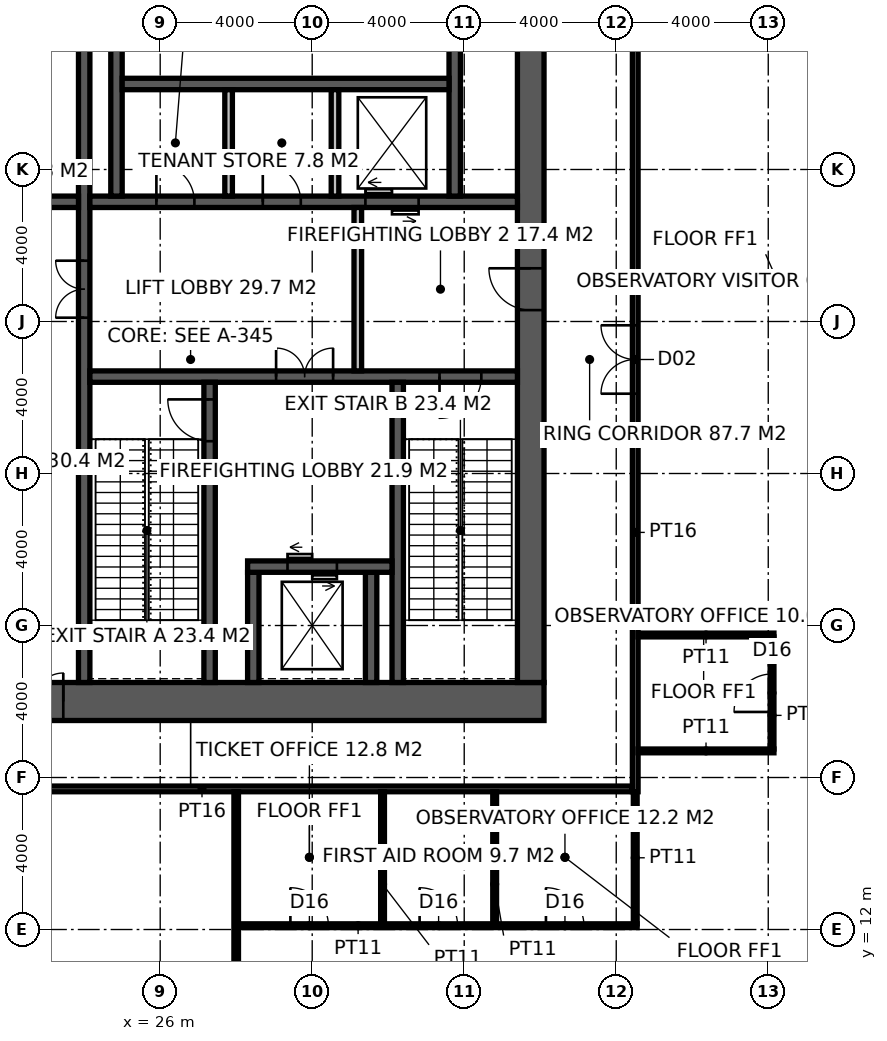
"""IFC4 building model, lengths in metres.
Left out: names, types, materials, properties, quantities, classifications, styles, units other than length and angle.
Written with IfcOpenShell. Run it as: python <this file> out.ifc"""

import sys

from ifc_helpers import new_model, si_unit, direction, frame, frame_2d, origin, place, context, subcontext, project, spatial, rectangle, extrude, element, fill, save


model = new_model("IFC4")
c1 = context("Model", 3, precision=1e-05, world=origin(), true_north=direction((0.0, 1.0)))
c2 = subcontext(c1, "Body", "Model", "MODEL_VIEW")
j1 = project(units=[si_unit("LENGTHUNIT", "METRE"), si_unit("PLANEANGLEUNIT", "RADIAN")], contexts=[c1])
p1 = place(None, origin())
s1 = spatial("IfcSite", under=j1, at=p1, CompositionType="ELEMENT")
p2 = place(p1, origin())
s2 = spatial("IfcBuilding", under=s1, at=p2, CompositionType="ELEMENT")
p3 = place(p2, frame((0.0, 0.0, 298.2)))
s3 = spatial("IfcBuildingStorey", under=s2, at=p3, CompositionType="ELEMENT", Elevation=298.2)
p4 = place(p3, frame((18.5, 18.0, -0.15), z_axis=(0.0, 0.0, 1.0), x_axis=(1.0, 0.0, 0.0)))
e1 = element("IfcWall", 1, at=p4, inside=s3, PredefinedType="SHEAR", context=c2, shape_type="SweptSolid", body=[
    extrude(rectangle(XDim=17.6, YDim=1.0, at=frame_2d((8.8, 0.0))), origin(), (0.0, 0.0, 1.0), 5.85),
])
p5 = place(p4, frame((3.45, 0.0, 0.15)))
e2 = element("IfcOpeningElement", 2, at=p5, cuts=e1, PredefinedType="OPENING", context=c2, shape_type="SweptSolid", body=[
    extrude(rectangle(XDim=1.5, YDim=2.4, at=frame_2d((0.75, 1.2))), frame((0.0, 0.51, 0.0), z_axis=(0.0, -1.0, 0.0), x_axis=(1.0, 0.0, 0.0)), (0.0, 0.0, 1.0), 1.02),
])
p6 = place(p3, frame((35.75, 18.5, -0.15), z_axis=(0.0, 0.0, 1.0), x_axis=(0.0, 1.0, 0.0)))
e3 = element("IfcWall", 3, at=p6, inside=s3, PredefinedType="SHEAR", context=c2, shape_type="SweptSolid", body=[
    extrude(rectangle(XDim=17.0, YDim=0.7, at=frame_2d((8.5, 0.0))), origin(), (0.0, 0.0, 1.0), 5.85),
])
p7 = place(p6, frame((9.8, 0.0, 0.15)))
e4 = element("IfcOpeningElement", 4, at=p7, cuts=e3, PredefinedType="OPENING", context=c2, shape_type="SweptSolid", body=[
    extrude(rectangle(XDim=1.1, YDim=2.2, at=frame_2d((0.55, 1.1))), frame((0.0, 0.36, 0.0), z_axis=(0.0, -1.0, 0.0), x_axis=(1.0, 0.0, 0.0)), (0.0, 0.0, 1.0), 0.72),
])
p8 = place(p3, frame((24.0, 18.5, -0.15), z_axis=(0.0, 0.0, 1.0), x_axis=(0.0, 1.0, 0.0)))
e5 = element("IfcWall", 5, at=p8, inside=s3, PredefinedType="SHEAR", context=c2, shape_type="SweptSolid", body=[
    extrude(rectangle(XDim=17.0, YDim=0.3, at=frame_2d((8.5, 0.0))), origin(), (0.0, 0.0, 1.0), 5.85),
])
p9 = place(p8, frame((9.6, 0.0, 0.15)))
e6 = element("IfcOpeningElement", 6, at=p9, cuts=e5, PredefinedType="OPENING", context=c2, shape_type="SweptSolid", body=[
    extrude(rectangle(XDim=1.5, YDim=2.4, at=frame_2d((0.75, 1.2))), frame((0.0, 0.16, 0.0), z_axis=(0.0, -1.0, 0.0), x_axis=(1.0, 0.0, 0.0)), (0.0, 0.0, 1.0), 0.32),
])
p10 = place(p3, frame((24.15, 26.55, -0.15), z_axis=(0.0, 0.0, 1.0), x_axis=(1.0, 0.0, 0.0)))
e7 = element("IfcWall", 7, at=p10, inside=s3, PredefinedType="SHEAR", context=c2, shape_type="SweptSolid", body=[
    extrude(rectangle(XDim=11.25, YDim=0.3, at=frame_2d((5.625, 0.0))), origin(), (0.0, 0.0, 1.0), 5.85),
])
p11 = place(p10, frame((9.2, 0.0, 0.15)))
e8 = element("IfcOpeningElement", 8, at=p11, cuts=e7, PredefinedType="OPENING", context=c2, shape_type="SweptSolid", body=[
    extrude(rectangle(XDim=1.1, YDim=2.2, at=frame_2d((0.55, 1.1))), frame((0.0, 0.16, 0.0), z_axis=(0.0, -1.0, 0.0), x_axis=(1.0, 0.0, 0.0)), (0.0, 0.0, 1.0), 0.32),
])
p12 = place(p10, frame((4.9, 0.0, 0.15)))
e9 = element("IfcOpeningElement", 9, at=p12, cuts=e7, PredefinedType="OPENING", context=c2, shape_type="SweptSolid", body=[
    extrude(rectangle(XDim=1.5, YDim=2.4, at=frame_2d((0.75, 1.2))), frame((0.0, 0.16, 0.0), z_axis=(0.0, -1.0, 0.0), x_axis=(1.0, 0.0, 0.0)), (0.0, 0.0, 1.0), 0.32),
])
p13 = place(p3, frame((27.3, 18.5, -0.15), z_axis=(0.0, 0.0, 1.0), x_axis=(0.0, 1.0, 0.0)))
e10 = element("IfcWall", 10, at=p13, inside=s3, PredefinedType="SHEAR", context=c2, shape_type="SweptSolid", body=[
    extrude(rectangle(XDim=7.9, YDim=0.3, at=frame_2d((3.95, 0.0))), origin(), (0.0, 0.0, 1.0), 5.85),
])
p14 = place(p13, frame((6.35, 0.0, 0.15)))
e11 = element("IfcOpeningElement", 11, at=p14, cuts=e10, PredefinedType="OPENING", context=c2, shape_type="SweptSolid", body=[
    extrude(rectangle(XDim=1.1, YDim=2.2, at=frame_2d((0.55, 1.1))), frame((0.0, 0.16, 0.0), z_axis=(0.0, -1.0, 0.0), x_axis=(1.0, 0.0, 0.0)), (0.0, 0.0, 1.0), 0.32),
])
p15 = place(p3, frame((32.25, 18.5, -0.15), z_axis=(0.0, 0.0, 1.0), x_axis=(0.0, 1.0, 0.0)))
e12 = element("IfcWall", 12, at=p15, inside=s3, PredefinedType="SHEAR", context=c2, shape_type="SweptSolid", body=[
    extrude(rectangle(XDim=7.9, YDim=0.3, at=frame_2d((3.95, 0.0))), origin(), (0.0, 0.0, 1.0), 5.85),
])
for number, where, z_axis, x_axis in (
    (13, (28.45, 18.5, -0.15), (0.0, 0.0, 1.0), (0.0, 1.0, 0.0)),
    (14, (31.55, 18.5, -0.15), (0.0, 0.0, 1.0), (0.0, 1.0, 0.0)),
):
    element("IfcWall", number, at=place(p3, frame(where, z_axis=z_axis, x_axis=x_axis)), inside=s3, PredefinedType="SHEAR", context=c2, shape_type="SweptSolid", body=[
        extrude(rectangle(XDim=2.9, YDim=0.3, at=frame_2d((1.45, 0.0))), origin(), (0.0, 0.0, 1.0), 5.85),
    ])
p16 = place(p3, frame((28.3, 21.55, -0.15), z_axis=(0.0, 0.0, 1.0), x_axis=(1.0, 0.0, 0.0)))
e15 = element("IfcWall", 15, at=p16, inside=s3, PredefinedType="SHEAR", context=c2, shape_type="SweptSolid", body=[
    extrude(rectangle(XDim=3.8, YDim=0.3, at=frame_2d((1.9, 0.0))), origin(), (0.0, 0.0, 1.0), 5.85),
])
p17 = place(p16, frame((1.05, 0.0, 0.15)))
e16 = element("IfcOpeningElement", 16, at=p17, cuts=e15, PredefinedType="OPENING", context=c2, shape_type="SweptSolid", body=[
    extrude(rectangle(XDim=1.3, YDim=2.4, at=frame_2d((0.65, 1.2))), frame((0.0, 0.16, 0.0), z_axis=(0.0, -1.0, 0.0), x_axis=(1.0, 0.0, 0.0)), (0.0, 0.0, 1.0), 0.32),
])
p18 = place(p3, frame((24.15, 31.15, -0.15), z_axis=(0.0, 0.0, 1.0), x_axis=(1.0, 0.0, 0.0)))
e17 = element("IfcWall", 17, at=p18, inside=s3, PredefinedType="SHEAR", context=c2, shape_type="SweptSolid", body=[
    extrude(rectangle(XDim=11.25, YDim=0.3, at=frame_2d((5.625, 0.0))), origin(), (0.0, 0.0, 1.0), 5.85),
])
p19 = place(p18, frame((1.75, 0.0, 0.15)))
e18 = element("IfcOpeningElement", 18, at=p19, cuts=e17, PredefinedType="OPENING", context=c2, shape_type="SweptSolid", body=[
    extrude(rectangle(XDim=1.0, YDim=2.2, at=frame_2d((0.5, 1.1))), frame((0.0, 0.16, 0.0), z_axis=(0.0, -1.0, 0.0), x_axis=(1.0, 0.0, 0.0)), (0.0, 0.0, 1.0), 0.32),
])
p20 = place(p18, frame((4.55, 0.0, 0.15)))
e19 = element("IfcOpeningElement", 19, at=p20, cuts=e17, PredefinedType="OPENING", context=c2, shape_type="SweptSolid", body=[
    extrude(rectangle(XDim=1.0, YDim=2.2, at=frame_2d((0.5, 1.1))), frame((0.0, 0.16, 0.0), z_axis=(0.0, -1.0, 0.0), x_axis=(1.0, 0.0, 0.0)), (0.0, 0.0, 1.0), 0.32),
])
p21 = place(p18, frame((7.25, 0.0, 0.15)))
e20 = element("IfcOpeningElement", 20, at=p21, cuts=e17, PredefinedType="OPENING", context=c2, shape_type="SweptSolid", body=[
    extrude(rectangle(XDim=1.4, YDim=2.4, at=frame_2d((0.7, 1.2))), frame((0.0, 0.16, 0.0), z_axis=(0.0, -1.0, 0.0), x_axis=(1.0, 0.0, 0.0)), (0.0, 0.0, 1.0), 0.32),
])
p22 = place(p3, frame((18.5, 31.15, -0.15), z_axis=(0.0, 0.0, 1.0), x_axis=(1.0, 0.0, 0.0)))
e21 = element("IfcWall", 21, at=p22, inside=s3, PredefinedType="SHEAR", context=c2, shape_type="SweptSolid", body=[
    extrude(rectangle(XDim=5.35, YDim=0.3, at=frame_2d((2.675, 0.0))), origin(), (0.0, 0.0, 1.0), 5.85),
])
p23 = place(p22, frame((3.4, 0.0, 0.15)))
e22 = element("IfcOpeningElement", 22, at=p23, cuts=e21, PredefinedType="OPENING", context=c2, shape_type="SweptSolid", body=[
    extrude(rectangle(XDim=1.0, YDim=2.2, at=frame_2d((0.5, 1.1))), frame((0.0, 0.16, 0.0), z_axis=(0.0, -1.0, 0.0), x_axis=(1.0, 0.0, 0.0)), (0.0, 0.0, 1.0), 0.32),
])
for number, where, z_axis, x_axis in (
    (23, (24.85, 31.3, -0.15), (0.0, 0.0, 1.0), (0.0, 1.0, 0.0)),
    (24, (33.75, 31.3, -0.15), (0.0, 0.0, 1.0), (0.0, 1.0, 0.0)),
):
    element("IfcWall", number, at=place(p3, frame(where, z_axis=z_axis, x_axis=x_axis)), inside=s3, PredefinedType="SHEAR", context=c2, shape_type="SweptSolid", body=[
        extrude(rectangle(XDim=4.2, YDim=0.3, at=frame_2d((2.1, 0.0))), origin(), (0.0, 0.0, 1.0), 5.85),
    ])
p24 = place(p3, frame((25.0, 34.25, -0.15), z_axis=(0.0, 0.0, 1.0), x_axis=(1.0, 0.0, 0.0)))
e25 = element("IfcWall", 25, at=p24, inside=s3, PredefinedType="SHEAR", context=c2, shape_type="SweptSolid", body=[
    extrude(rectangle(XDim=8.6, YDim=0.3, at=frame_2d((4.3, 0.0))), origin(), (0.0, 0.0, 1.0), 5.85),
])
p25 = place(p3, frame((27.8, 31.3, 0.0), z_axis=(0.0, 0.0, 1.0), x_axis=(0.0, 1.0, 0.0)))
e26 = element("IfcWall", 26, at=p25, inside=s3, PredefinedType="SOLIDWALL", context=c2, shape_type="SweptSolid", body=[
    extrude(rectangle(XDim=2.8, YDim=0.2, at=frame_2d((1.4, 0.0))), origin(), (0.0, 0.0, 1.0), 5.7),
])
p26 = place(p3, frame((30.6, 31.3, -0.15), z_axis=(0.0, 0.0, 1.0), x_axis=(0.0, 1.0, 0.0)))
e27 = element("IfcWall", 27, at=p26, inside=s3, PredefinedType="SOLIDWALL", context=c2, shape_type="SweptSolid", body=[
    extrude(rectangle(XDim=2.8, YDim=0.2, at=frame_2d((1.4, 0.0))), origin(), (0.0, 0.0, 1.0), 5.85),
])
p27 = place(p3, frame((31.2, 26.7, 0.0), z_axis=(0.0, 0.0, 1.0), x_axis=(0.0, 1.0, 0.0)))
e28 = element("IfcWall", 28, at=p27, inside=s3, PredefinedType="SOLIDWALL", context=c2, shape_type="SweptSolid", body=[
    extrude(rectangle(XDim=4.3, YDim=0.2, at=frame_2d((2.15, 0.0))), origin(), (0.0, 0.0, 1.0), 5.7),
])
p28 = place(p3, frame((38.5, 15.625, 0.0), z_axis=(0.0, 0.0, 1.0), x_axis=(0.0, 1.0, 0.0)))
e29 = element("IfcWall", 29, at=p28, inside=s3, PredefinedType="PARTITIONING", context=c2, shape_type="SweptSolid", body=[
    extrude(rectangle(XDim=22.75, YDim=0.15, at=frame_2d((11.375, 0.0))), origin(), (0.0, 0.0, 1.0), 5.7),
])
p29 = place(p28, frame((10.475, 0.0, 0.0)))
e30 = element("IfcOpeningElement", 30, at=p29, cuts=e29, PredefinedType="OPENING", context=c2, shape_type="SweptSolid", body=[
    extrude(rectangle(XDim=1.8, YDim=2.4, at=frame_2d((0.9, 1.2))), frame((0.0, 0.085, 0.0), z_axis=(0.0, -1.0, 0.0), x_axis=(1.0, 0.0, 0.0)), (0.0, 0.0, 1.0), 0.17),
])
p30 = place(p3, frame((15.775, 15.7, 0.0), z_axis=(0.0, 0.0, 1.0), x_axis=(1.0, 0.0, 0.0)))
e31 = element("IfcWall", 31, at=p30, inside=s3, PredefinedType="PARTITIONING", context=c2, shape_type="SweptSolid", body=[
    extrude(rectangle(XDim=22.65, YDim=0.15, at=frame_2d((11.325, 0.0))), origin(), (0.0, 0.0, 1.0), 5.7),
])
p31 = place(p30, frame((5.225, 0.0, 0.0)))
e32 = element("IfcOpeningElement", 32, at=p31, cuts=e31, PredefinedType="OPENING", context=c2, shape_type="SweptSolid", body=[
    extrude(rectangle(XDim=2.0, YDim=2.7, at=frame_2d((1.0, 1.35))), frame((0.0, 0.085, 0.0), z_axis=(0.0, -1.0, 0.0), x_axis=(1.0, 0.0, 0.0)), (0.0, 0.0, 1.0), 0.17),
])
p32 = place(p3, frame((28.0, 4.3, 0.0), z_axis=(0.0, 0.0, 1.0), x_axis=(0.0, 1.0, 0.0)))
e33 = element("IfcWall", 33, at=p32, inside=s3, PredefinedType="PARTITIONING", context=c2, shape_type="SweptSolid", body=[
    extrude(rectangle(XDim=11.325, YDim=0.12, at=frame_2d((5.663, 0.0))), origin(), (0.0, 0.0, 1.0), 5.7),
])
p33 = place(p3, frame((28.061, 12.1, 0.0), z_axis=(0.0, 0.0, 1.0), x_axis=(1.0, 0.0, 0.0)))
e34 = element("IfcWall", 34, at=p33, inside=s3, PredefinedType="PARTITIONING", context=c2, shape_type="SweptSolid", body=[
    extrude(rectangle(XDim=10.489, YDim=0.1, at=frame_2d((5.245, 0.0))), origin(), (0.0, 0.0, 1.0), 5.7),
])
p34 = place(p33, frame((1.365, 0.0, 0.0)))
e35 = element("IfcOpeningElement", 35, at=p34, cuts=e34, PredefinedType="OPENING", context=c2, shape_type="SweptSolid", body=[
    extrude(rectangle(XDim=1.0, YDim=2.2, at=frame_2d((0.5, 1.1))), frame((0.0, 0.06, 0.0), z_axis=(0.0, -1.0, 0.0), x_axis=(1.0, 0.0, 0.0)), (0.0, 0.0, 1.0), 0.12),
])
p35 = place(p33, frame((4.765, 0.0, 0.0)))
e36 = element("IfcOpeningElement", 36, at=p35, cuts=e34, PredefinedType="OPENING", context=c2, shape_type="SweptSolid", body=[
    extrude(rectangle(XDim=1.0, YDim=2.2, at=frame_2d((0.5, 1.1))), frame((0.0, 0.06, 0.0), z_axis=(0.0, -1.0, 0.0), x_axis=(1.0, 0.0, 0.0)), (0.0, 0.0, 1.0), 0.12),
])
p36 = place(p33, frame((8.09, 0.0, 0.0)))
e37 = element("IfcOpeningElement", 37, at=p36, cuts=e34, PredefinedType="OPENING", context=c2, shape_type="SweptSolid", body=[
    extrude(rectangle(XDim=1.0, YDim=2.2, at=frame_2d((0.5, 1.1))), frame((0.0, 0.06, 0.0), z_axis=(0.0, -1.0, 0.0), x_axis=(1.0, 0.0, 0.0)), (0.0, 0.0, 1.0), 0.12),
])
p37 = place(p3, frame((38.575, 16.7, 0.0), z_axis=(0.0, 0.0, 1.0), x_axis=(1.0, 0.0, 0.0)))
e38 = element("IfcWall", 38, at=p37, inside=s3, PredefinedType="PARTITIONING", context=c2, shape_type="SweptSolid", body=[
    extrude(rectangle(XDim=3.575, YDim=0.1, at=frame_2d((1.788, 0.0))), origin(), (0.0, 0.0, 1.0), 5.7),
])
p38 = place(p3, frame((38.575, 19.75, 0.0), z_axis=(0.0, 0.0, 1.0), x_axis=(1.0, 0.0, 0.0)))
e39 = element("IfcWall", 39, at=p38, inside=s3, PredefinedType="PARTITIONING", context=c2, shape_type="SweptSolid", body=[
    extrude(rectangle(XDim=3.575, YDim=0.1, at=frame_2d((1.788, 0.0))), origin(), (0.0, 0.0, 1.0), 4.8),
])
for number, where, z_axis, x_axis in (
    (40, (31.851, 12.15, 0.0), (0.0, 0.0, 1.0), (0.0, 1.0, 0.0)),
    (41, (34.801, 12.15, 0.0), (0.0, 0.0, 1.0), (0.0, 1.0, 0.0)),
    (42, (38.5, 12.15, 0.0), (0.0, 0.0, 1.0), (0.0, 1.0, 0.0)),
):
    element("IfcWall", number, at=place(p3, frame(where, z_axis=z_axis, x_axis=x_axis)), inside=s3, PredefinedType="PARTITIONING", context=c2, shape_type="SweptSolid", body=[
        extrude(rectangle(XDim=3.475, YDim=0.1, at=frame_2d((1.738, 0.0))), origin(), (0.0, 0.0, 1.0), 5.7),
    ])
p39 = place(p3, frame((42.1, 16.75, 0.0), z_axis=(0.0, 0.0, 1.0), x_axis=(0.0, 1.0, 0.0)))
e43 = element("IfcWall", 43, at=p39, inside=s3, PredefinedType="PARTITIONING", context=c2, shape_type="SweptSolid", body=[
    extrude(rectangle(XDim=2.95, YDim=0.1, at=frame_2d((1.475, 0.0))), origin(), (0.0, 0.0, 1.0), 4.8),
])
p40 = place(p39, frame((0.975, 0.0, 0.0)))
e44 = element("IfcOpeningElement", 44, at=p40, cuts=e43, PredefinedType="OPENING", context=c2, shape_type="SweptSolid", body=[
    extrude(rectangle(XDim=1.0, YDim=2.2, at=frame_2d((0.5, 1.1))), frame((0.0, 0.06, 0.0), z_axis=(0.0, -1.0, 0.0), x_axis=(1.0, 0.0, 0.0)), (0.0, 0.0, 1.0), 0.12),
])
p41 = place(p14, origin())
e45 = element("IfcDoor", 45, at=p41, inside=s3, OperationType="SINGLE_SWING_RIGHT", PredefinedType="DOOR", context=c2, shape_type="SweptSolid", body=[
    extrude(rectangle(XDim=1.1, YDim=2.2, at=frame_2d((0.55, 1.1))), frame((0.0, 0.025, 0.0), z_axis=(0.0, -1.0, 0.0), x_axis=(1.0, 0.0, 0.0)), (0.0, 0.0, 1.0), 0.05),
])
fill(e11, e45)
p42 = place(p11, frame((1.1, 0.0, 0.0), z_axis=(0.0, 0.0, 1.0), x_axis=(-1.0, 0.0, 0.0)))
e46 = element("IfcDoor", 46, at=p42, inside=s3, OperationType="SINGLE_SWING_RIGHT", PredefinedType="DOOR", context=c2, shape_type="SweptSolid", body=[
    extrude(rectangle(XDim=1.1, YDim=2.2, at=frame_2d((0.55, 1.1))), frame((0.0, 0.025, 0.0), z_axis=(0.0, -1.0, 0.0), x_axis=(1.0, 0.0, 0.0)), (0.0, 0.0, 1.0), 0.05),
])
fill(e8, e46)
p43 = place(p7, origin())
e47 = element("IfcDoor", 47, at=p43, inside=s3, OperationType="SINGLE_SWING_RIGHT", PredefinedType="DOOR", context=c2, shape_type="SweptSolid", body=[
    extrude(rectangle(XDim=1.1, YDim=2.2, at=frame_2d((0.55, 1.1))), frame((0.0, 0.025, 0.0), z_axis=(0.0, -1.0, 0.0), x_axis=(1.0, 0.0, 0.0)), (0.0, 0.0, 1.0), 0.05),
])
fill(e4, e47)
p44 = place(p12, origin())
e48 = element("IfcDoor", 48, at=p44, inside=s3, OperationType="DOUBLE_DOOR_DOUBLE_SWING", PredefinedType="DOOR", context=c2, shape_type="SweptSolid", body=[
    extrude(rectangle(XDim=1.5, YDim=2.4, at=frame_2d((0.75, 1.2))), frame((0.0, 0.025, 0.0), z_axis=(0.0, -1.0, 0.0), x_axis=(1.0, 0.0, 0.0)), (0.0, 0.0, 1.0), 0.05),
])
fill(e9, e48)
p45 = place(p9, origin())
e49 = element("IfcDoor", 49, at=p45, inside=s3, OperationType="DOUBLE_DOOR_DOUBLE_SWING", PredefinedType="DOOR", context=c2, shape_type="SweptSolid", body=[
    extrude(rectangle(XDim=1.5, YDim=2.4, at=frame_2d((0.75, 1.2))), frame((0.0, 0.025, 0.0), z_axis=(0.0, -1.0, 0.0), x_axis=(1.0, 0.0, 0.0)), (0.0, 0.0, 1.0), 0.05),
])
fill(e6, e49)
p46 = place(p19, origin())
e50 = element("IfcDoor", 50, at=p46, inside=s3, OperationType="SINGLE_SWING_LEFT", PredefinedType="DOOR", context=c2, shape_type="SweptSolid", body=[
    extrude(rectangle(XDim=1.0, YDim=2.2, at=frame_2d((0.5, 1.1))), frame((0.0, 0.025, 0.0), z_axis=(0.0, -1.0, 0.0), x_axis=(1.0, 0.0, 0.0)), (0.0, 0.0, 1.0), 0.05),
])
fill(e18, e50)
p47 = place(p20, origin())
e51 = element("IfcDoor", 51, at=p47, inside=s3, OperationType="SINGLE_SWING_LEFT", PredefinedType="DOOR", context=c2, shape_type="SweptSolid", body=[
    extrude(rectangle(XDim=1.0, YDim=2.2, at=frame_2d((0.5, 1.1))), frame((0.0, 0.025, 0.0), z_axis=(0.0, -1.0, 0.0), x_axis=(1.0, 0.0, 0.0)), (0.0, 0.0, 1.0), 0.05),
])
fill(e19, e51)
p48 = place(p5, origin())
e52 = element("IfcDoor", 52, at=p48, inside=s3, OperationType="DOUBLE_DOOR_DOUBLE_SWING", PredefinedType="DOOR", context=c2, shape_type="SweptSolid", body=[
    extrude(rectangle(XDim=1.5, YDim=2.4, at=frame_2d((0.75, 1.2))), frame((0.0, 0.025, 0.0), z_axis=(0.0, -1.0, 0.0), x_axis=(1.0, 0.0, 0.0)), (0.0, 0.0, 1.0), 0.05),
])
fill(e2, e52)
p49 = place(p29, origin())
e53 = element("IfcDoor", 53, at=p49, inside=s3, OperationType="DOUBLE_DOOR_DOUBLE_SWING", PredefinedType="DOOR", context=c2, shape_type="SweptSolid", body=[
    extrude(rectangle(XDim=1.8, YDim=2.4, at=frame_2d((0.9, 1.2))), frame((0.0, 0.025, 0.0), z_axis=(0.0, -1.0, 0.0), x_axis=(1.0, 0.0, 0.0)), (0.0, 0.0, 1.0), 0.05),
])
fill(e30, e53)
p50 = place(p34, origin())
e54 = element("IfcDoor", 54, at=p50, inside=s3, OperationType="SINGLE_SWING_LEFT", PredefinedType="DOOR", context=c2, shape_type="SweptSolid", body=[
    extrude(rectangle(XDim=1.0, YDim=2.2, at=frame_2d((0.5, 1.1))), frame((0.0, 0.025, 0.0), z_axis=(0.0, -1.0, 0.0), x_axis=(1.0, 0.0, 0.0)), (0.0, 0.0, 1.0), 0.05),
])
fill(e35, e54)
p51 = place(p35, origin())
e55 = element("IfcDoor", 55, at=p51, inside=s3, OperationType="SINGLE_SWING_LEFT", PredefinedType="DOOR", context=c2, shape_type="SweptSolid", body=[
    extrude(rectangle(XDim=1.0, YDim=2.2, at=frame_2d((0.5, 1.1))), frame((0.0, 0.025, 0.0), z_axis=(0.0, -1.0, 0.0), x_axis=(1.0, 0.0, 0.0)), (0.0, 0.0, 1.0), 0.05),
])
fill(e36, e55)
p52 = place(p36, origin())
e56 = element("IfcDoor", 56, at=p52, inside=s3, OperationType="SINGLE_SWING_LEFT", PredefinedType="DOOR", context=c2, shape_type="SweptSolid", body=[
    extrude(rectangle(XDim=1.0, YDim=2.2, at=frame_2d((0.5, 1.1))), frame((0.0, 0.025, 0.0), z_axis=(0.0, -1.0, 0.0), x_axis=(1.0, 0.0, 0.0)), (0.0, 0.0, 1.0), 0.05),
])
fill(e37, e56)
p53 = place(p40, origin())
e57 = element("IfcDoor", 57, at=p53, inside=s3, OperationType="SINGLE_SWING_LEFT", PredefinedType="DOOR", context=c2, shape_type="SweptSolid", body=[
    extrude(rectangle(XDim=1.0, YDim=2.2, at=frame_2d((0.5, 1.1))), frame((0.0, 0.025, 0.0), z_axis=(0.0, -1.0, 0.0), x_axis=(1.0, 0.0, 0.0)), (0.0, 0.0, 1.0), 0.05),
])
fill(e44, e57)
p54 = place(p17, origin())
e58 = element("IfcDoor", 58, at=p54, inside=s3, OperationType="DOUBLE_DOOR_SLIDING", PredefinedType="DOOR", context=c2, shape_type="SweptSolid", body=[
    extrude(rectangle(XDim=1.3, YDim=2.4, at=frame_2d((0.65, 1.2))), frame((0.0, 0.025, 0.0), z_axis=(0.0, -1.0, 0.0), x_axis=(1.0, 0.0, 0.0)), (0.0, 0.0, 1.0), 0.05),
])
fill(e16, e58)
p55 = place(p21, origin())
e59 = element("IfcDoor", 59, at=p55, inside=s3, OperationType="DOUBLE_DOOR_SLIDING", PredefinedType="DOOR", context=c2, shape_type="SweptSolid", body=[
    extrude(rectangle(XDim=1.4, YDim=2.4, at=frame_2d((0.7, 1.2))), frame((0.0, 0.025, 0.0), z_axis=(0.0, -1.0, 0.0), x_axis=(1.0, 0.0, 0.0)), (0.0, 0.0, 1.0), 0.05),
])
fill(e20, e59)
save(model, sys.argv[1])
